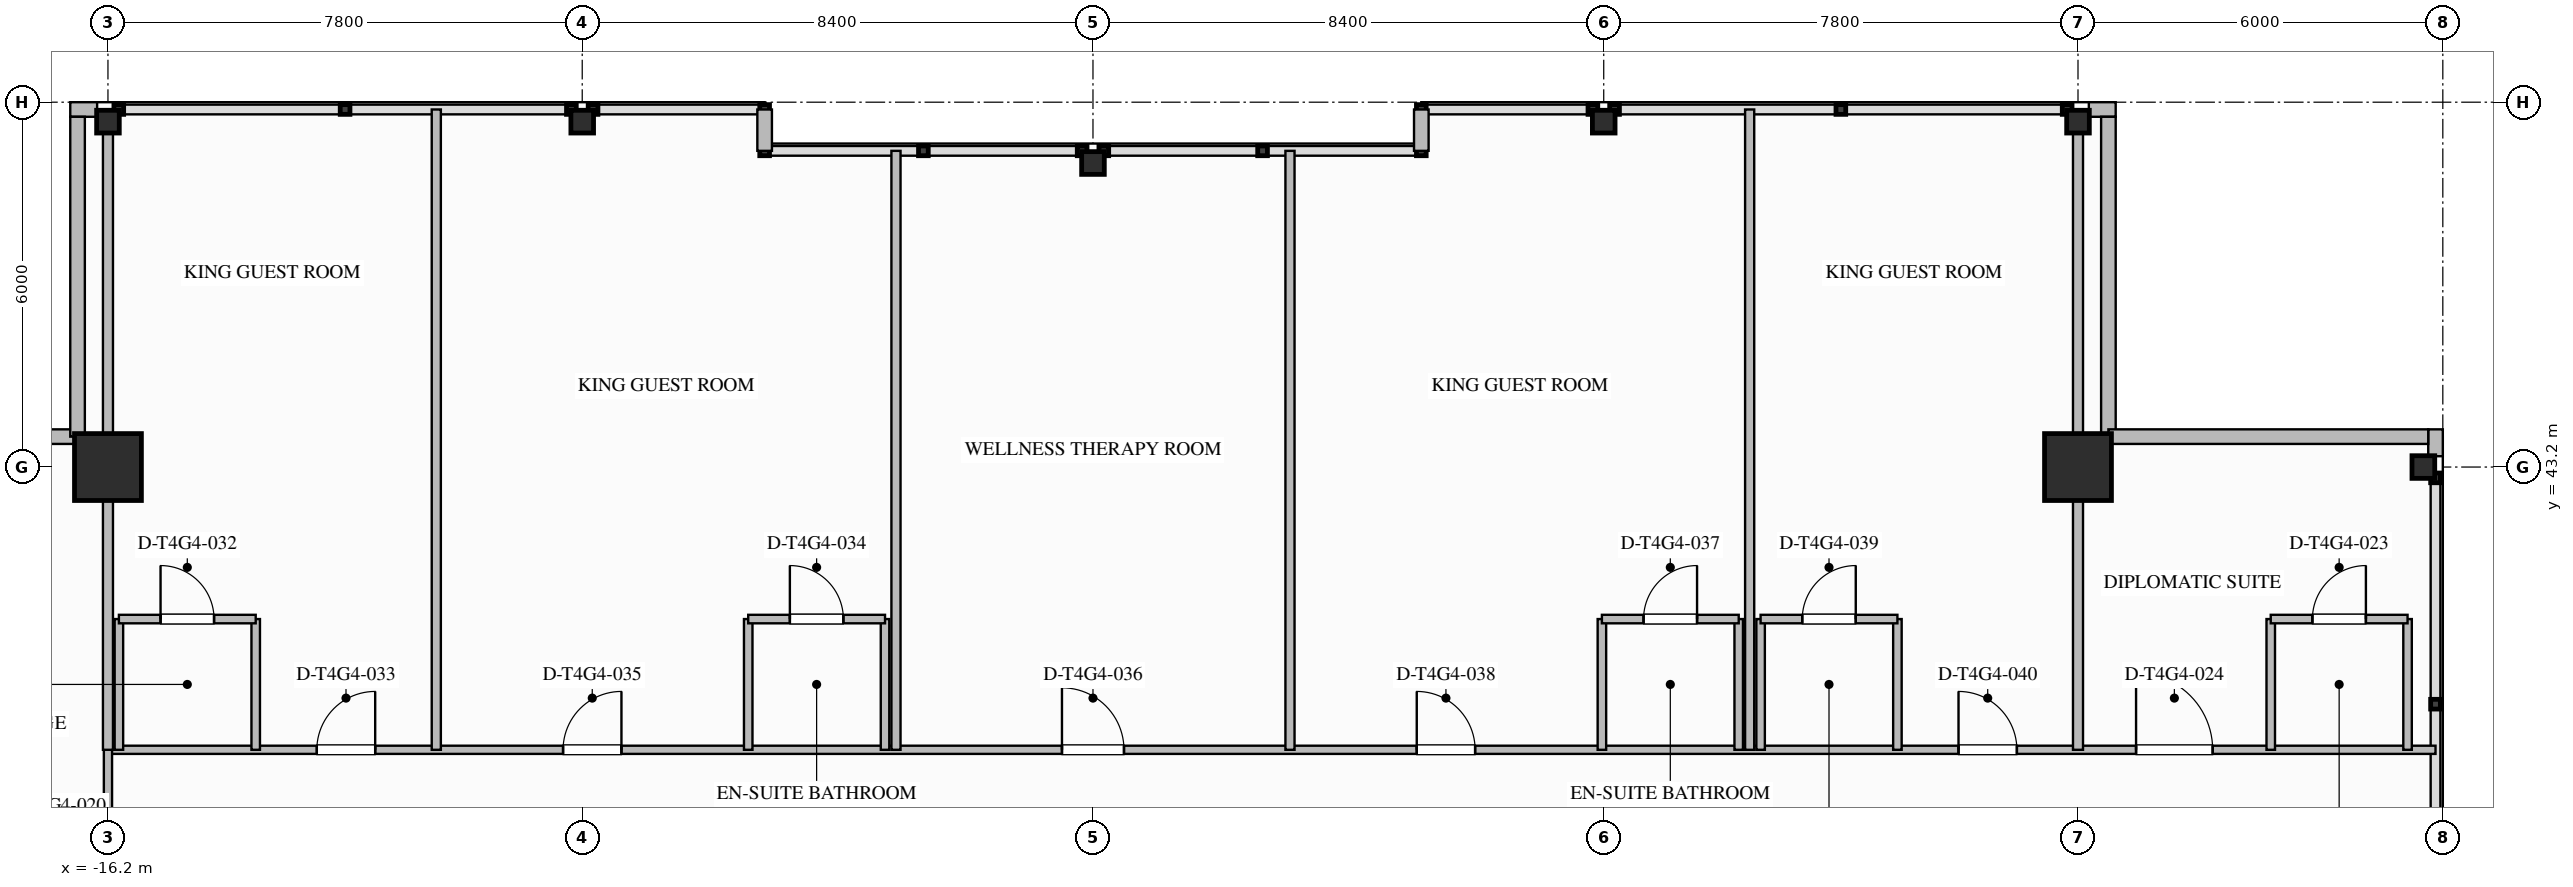
"""IFC4 building model, lengths in metres.
Left out: names, types, materials, properties, quantities, classifications, styles, units other than length and angle.
Written with IfcOpenShell. Run it as: python <this file> out.ifc"""

import sys

from ifc_helpers import new_model, si_unit, direction, frame, frame_2d, origin, origin_2d, place, context, subcontext, project, spatial, rectangle, i_section, extrude, element, fill, save


model = new_model("IFC4")
c1 = context("Model", 3, precision=1e-05, world=origin(), true_north=direction((0.0, 1.0)))
c2 = subcontext(c1, "Body", "Model", "MODEL_VIEW")
j1 = project(units=[si_unit("LENGTHUNIT", "METRE"), si_unit("PLANEANGLEUNIT", "RADIAN")], contexts=[c1])
p1 = place(None, origin())
s1 = spatial("IfcSite", under=j1, at=p1, CompositionType="ELEMENT")
p2 = place(p1, origin())
s2 = spatial("IfcBuilding", under=s1, at=p2, CompositionType="ELEMENT")
p3 = place(p2, frame((0.0, 0.0, 237.5)))
s3 = spatial("IfcBuildingStorey", under=s2, at=p3, CompositionType="ELEMENT", Elevation=237.5)
for number, where, z_axis, x_axis in (
    (1, (-16.2, 43.2, 0.0), (0.0, 0.0, 1.0), (1.0, 0.0, 0.0)),
    (2, (16.2, 43.2, 0.0), (0.0, 0.0, 1.0), (1.0, 0.0, 0.0)),
):
    element("IfcColumn", number, at=place(p3, frame(where, z_axis=z_axis, x_axis=x_axis)), inside=s3, PredefinedType="COLUMN", context=c2, shape_type="SweptSolid", body=[
        extrude(rectangle(XDim=1.1, YDim=1.1, at=origin_2d()), origin(), (0.0, 0.0, 1.0), 3.6),
    ])
for number, where, z_axis, x_axis in (
    (3, (21.88, 43.2, 0.0), (0.0, 0.0, 1.0), (1.0, 0.0, 0.0)),
    (4, (-16.2, 48.88, 0.0), (0.0, 0.0, 1.0), (0.0, 1.0, 0.0)),
    (5, (-8.4, 48.88, 0.0), (0.0, 0.0, 1.0), (0.0, 1.0, 0.0)),
    (6, (0.0, 48.2, 0.0), (0.0, 0.0, 1.0), (0.0, 1.0, 0.0)),
    (7, (8.4, 48.88, 0.0), (0.0, 0.0, 1.0), (0.0, 1.0, 0.0)),
    (8, (16.2, 48.88, 0.0), (0.0, 0.0, 1.0), (0.0, 1.0, 0.0)),
):
    element("IfcColumn", number, at=place(p3, frame(where, z_axis=z_axis, x_axis=x_axis)), inside=s3, PredefinedType="COLUMN", context=c2, shape_type="SweptSolid", body=[
        extrude(i_section(OverallWidth=0.374, OverallDepth=0.372, WebThickness=0.016, FlangeThickness=0.026, FilletRadius=0.025, at=origin_2d()), origin(), (0.0, 0.0, 1.0), 3.597),
    ])
for number, where, z_axis, x_axis in (
    (9, (22.08, 43.82, 0.0), (0.0, 0.0, 1.0), (0.0, -1.0, 0.0)),
    (10, (-16.82, 49.08, 0.0), (0.0, 0.0, 1.0), (1.0, 0.0, 0.0)),
    (11, (16.378, 49.08, 0.0), (0.0, 0.0, 1.0), (1.0, 0.0, 0.0)),
):
    element("IfcWall", number, at=place(p3, frame(where, z_axis=z_axis, x_axis=x_axis)), inside=s3, PredefinedType="STANDARD", context=c2, shape_type="SweptSolid", body=[
        extrude(rectangle(XDim=0.442, YDim=0.24, at=frame_2d((0.221, 0.0))), origin(), (0.0, 0.0, 1.0), 3.34),
    ])
for number, where, z_axis, x_axis in (
    (12, (-21.96, 43.7, 0.0), (0.0, 0.0, 1.0), (1.0, 0.0, 0.0)),
    (13, (-16.7, 43.7, 0.0), (0.0, 0.0, 1.0), (0.0, 1.0, 0.0)),
    (14, (16.7, 48.96, 0.0), (0.0, 0.0, 1.0), (0.0, -1.0, 0.0)),
    (15, (16.7, 43.7, 0.0), (0.0, 0.0, 1.0), (1.0, 0.0, 0.0)),
):
    element("IfcWall", number, at=place(p3, frame(where, z_axis=z_axis, x_axis=x_axis)), inside=s3, PredefinedType="STANDARD", context=c2, shape_type="SweptSolid", body=[
        extrude(rectangle(XDim=5.26, YDim=0.24, at=frame_2d((2.63, 0.0))), origin(), (0.0, 0.0, 1.0), 3.34),
    ])
for number, where, z_axis, x_axis in (
    (16, (-5.4, 49.08, 0.0), (0.0, 0.0, 1.0), (0.0, -1.0, 0.0)),
    (17, (5.4, 48.4, 0.0), (0.0, 0.0, 1.0), (0.0, 1.0, 0.0)),
):
    element("IfcWall", number, at=place(p3, frame(where, z_axis=z_axis, x_axis=x_axis)), inside=s3, PredefinedType="STANDARD", context=c2, shape_type="SweptSolid", body=[
        extrude(rectangle(XDim=0.68, YDim=0.24, at=frame_2d((0.34, 0.0))), origin(), (0.0, 0.0, 1.0), 3.34),
    ])
p4 = place(p3, frame((-16.2, 38.55, 0.0), z_axis=(0.0, 0.0, 1.0), x_axis=(1.0, 0.0, 0.0)))
e18 = element("IfcWall", 18, at=p4, inside=s3, PredefinedType="PARTITIONING", context=c2, shape_type="SweptSolid", body=[
    extrude(rectangle(XDim=38.28, YDim=0.135, at=frame_2d((19.14, 0.0))), origin(), (0.0, 0.0, 1.0), 3.34),
])
p5 = place(p4, frame((33.355, 0.0, 0.0)))
e19 = element("IfcOpeningElement", 19, at=p5, cuts=e18, PredefinedType="OPENING", context=c2, shape_type="SweptSolid", body=[
    extrude(rectangle(XDim=1.26, YDim=2.2, at=frame_2d((0.63, 1.1))), frame((0.0, 0.077, 0.0), z_axis=(0.0, -1.0, 0.0), x_axis=(1.0, 0.0, 0.0)), (0.0, 0.0, 1.0), 0.155),
])
p6 = place(p4, frame((3.435, 0.0, 0.0)))
e20 = element("IfcOpeningElement", 20, at=p6, cuts=e18, PredefinedType="OPENING", context=c2, shape_type="SweptSolid", body=[
    extrude(rectangle(XDim=0.96, YDim=2.15, at=frame_2d((0.48, 1.075))), frame((0.0, 0.077, 0.0), z_axis=(0.0, -1.0, 0.0), x_axis=(1.0, 0.0, 0.0)), (0.0, 0.0, 1.0), 0.155),
])
p7 = place(p4, frame((7.485, 0.0, 0.0)))
e21 = element("IfcOpeningElement", 21, at=p7, cuts=e18, PredefinedType="OPENING", context=c2, shape_type="SweptSolid", body=[
    extrude(rectangle(XDim=0.96, YDim=2.15, at=frame_2d((0.48, 1.075))), frame((0.0, 0.077, 0.0), z_axis=(0.0, -1.0, 0.0), x_axis=(1.0, 0.0, 0.0)), (0.0, 0.0, 1.0), 0.155),
])
p8 = place(p4, frame((15.69, 0.0, 0.0)))
e22 = element("IfcOpeningElement", 22, at=p8, cuts=e18, PredefinedType="OPENING", context=c2, shape_type="SweptSolid", body=[
    extrude(rectangle(XDim=1.02, YDim=2.15, at=frame_2d((0.51, 1.075))), frame((0.0, 0.077, 0.0), z_axis=(0.0, -1.0, 0.0), x_axis=(1.0, 0.0, 0.0)), (0.0, 0.0, 1.0), 0.155),
])
p9 = place(p4, frame((21.525, 0.0, 0.0)))
e23 = element("IfcOpeningElement", 23, at=p9, cuts=e18, PredefinedType="OPENING", context=c2, shape_type="SweptSolid", body=[
    extrude(rectangle(XDim=0.96, YDim=2.15, at=frame_2d((0.48, 1.075))), frame((0.0, 0.077, 0.0), z_axis=(0.0, -1.0, 0.0), x_axis=(1.0, 0.0, 0.0)), (0.0, 0.0, 1.0), 0.155),
])
p10 = place(p4, frame((30.435, 0.0, 0.0)))
e24 = element("IfcOpeningElement", 24, at=p10, cuts=e18, PredefinedType="OPENING", context=c2, shape_type="SweptSolid", body=[
    extrude(rectangle(XDim=0.96, YDim=2.15, at=frame_2d((0.48, 1.075))), frame((0.0, 0.077, 0.0), z_axis=(0.0, -1.0, 0.0), x_axis=(1.0, 0.0, 0.0)), (0.0, 0.0, 1.0), 0.155),
])
p11 = place(p3, frame((-16.2, 35.6, 0.0), z_axis=(0.0, 0.0, 1.0), x_axis=(0.0, 1.0, 0.0)))
e25 = element("IfcWall", 25, at=p11, inside=s3, PredefinedType="PARTITIONING", context=c2, shape_type="SweptSolid", body=[
    extrude(rectangle(XDim=2.95, YDim=0.135, at=frame_2d((1.475, 0.0))), origin(), (0.0, 0.0, 1.0), 2.714),
])
p12 = place(p11, frame((0.52, 0.0, 0.0)))
e26 = element("IfcOpeningElement", 26, at=p12, cuts=e25, PredefinedType="OPENING", context=c2, shape_type="SweptSolid", body=[
    extrude(rectangle(XDim=1.02, YDim=2.15, at=frame_2d((0.51, 1.075))), frame((0.0, 0.077, 0.0), z_axis=(0.0, -1.0, 0.0), x_axis=(1.0, 0.0, 0.0)), (0.0, 0.0, 1.0), 0.155),
])
for number, where, z_axis, x_axis in (
    (27, (-16.2, 38.55, 0.0), (0.0, 0.0, 1.0), (0.0, 1.0, 0.0)),
    (28, (16.2, 38.55, 0.0), (0.0, 0.0, 1.0), (0.0, 1.0, 0.0)),
):
    element("IfcWall", number, at=place(p3, frame(where, z_axis=z_axis, x_axis=x_axis)), inside=s3, PredefinedType="PARTITIONING", context=c2, shape_type="SweptSolid", body=[
        extrude(rectangle(XDim=10.53, YDim=0.165, at=frame_2d((5.265, 0.0))), origin(), (0.0, 0.0, 1.0), 2.714),
    ])
for number, where, z_axis, x_axis in (
    (29, (19.37, 38.55, 0.0), (0.0, 0.0, 1.0), (0.0, 1.0, 0.0)),
    (30, (21.62, 38.55, 0.0), (0.0, 0.0, 1.0), (0.0, 1.0, 0.0)),
):
    element("IfcWall", number, at=place(p3, frame(where, z_axis=z_axis, x_axis=x_axis)), inside=s3, PredefinedType="PLUMBINGWALL", context=c2, shape_type="SweptSolid", body=[
        extrude(rectangle(XDim=2.15, YDim=0.14, at=frame_2d((1.075, 0.0))), origin(), (0.0, 0.0, 1.0), 3.34),
    ])
p13 = place(p3, frame((19.37, 40.7, 0.0), z_axis=(0.0, 0.0, 1.0), x_axis=(1.0, 0.0, 0.0)))
e31 = element("IfcWall", 31, at=p13, inside=s3, PredefinedType="PLUMBINGWALL", context=c2, shape_type="SweptSolid", body=[
    extrude(rectangle(XDim=2.25, YDim=0.14, at=frame_2d((1.125, 0.0))), origin(), (0.0, 0.0, 1.0), 3.34),
])
p14 = place(p13, frame((0.685, 0.0, 0.0)))
e32 = element("IfcOpeningElement", 32, at=p14, cuts=e31, PredefinedType="OPENING", context=c2, shape_type="SweptSolid", body=[
    extrude(rectangle(XDim=0.88, YDim=2.1, at=frame_2d((0.44, 1.05))), frame((0.0, 0.08, 0.0), z_axis=(0.0, -1.0, 0.0), x_axis=(1.0, 0.0, 0.0)), (0.0, 0.0, 1.0), 0.16),
])
p15 = place(p3, frame((-16.02, 38.55, 0.0), z_axis=(0.0, 0.0, 1.0), x_axis=(0.0, 1.0, 0.0)))
e33 = element("IfcWall", 33, at=p15, inside=s3, PredefinedType="PLUMBINGWALL", context=c2, shape_type="SweptSolid", body=[
    extrude(rectangle(XDim=2.15, YDim=0.14, at=frame_2d((1.075, 0.0))), origin(), (0.0, 0.0, 1.0), 2.714),
])
p16 = place(p3, frame((-13.77, 38.55, 0.0), z_axis=(0.0, 0.0, 1.0), x_axis=(0.0, 1.0, 0.0)))
e34 = element("IfcWall", 34, at=p16, inside=s3, PredefinedType="PLUMBINGWALL", context=c2, shape_type="SweptSolid", body=[
    extrude(rectangle(XDim=2.15, YDim=0.14, at=frame_2d((1.075, 0.0))), origin(), (0.0, 0.0, 1.0), 3.34),
])
p17 = place(p3, frame((-16.02, 40.7, 0.0), z_axis=(0.0, 0.0, 1.0), x_axis=(1.0, 0.0, 0.0)))
e35 = element("IfcWall", 35, at=p17, inside=s3, PredefinedType="PLUMBINGWALL", context=c2, shape_type="SweptSolid", body=[
    extrude(rectangle(XDim=2.25, YDim=0.14, at=frame_2d((1.125, 0.0))), origin(), (0.0, 0.0, 1.0), 3.34),
])
p18 = place(p17, frame((0.685, 0.0, 0.0)))
e36 = element("IfcOpeningElement", 36, at=p18, cuts=e35, PredefinedType="OPENING", context=c2, shape_type="SweptSolid", body=[
    extrude(rectangle(XDim=0.88, YDim=2.1, at=frame_2d((0.44, 1.05))), frame((0.0, 0.08, 0.0), z_axis=(0.0, -1.0, 0.0), x_axis=(1.0, 0.0, 0.0)), (0.0, 0.0, 1.0), 0.16),
])
p19 = place(p3, frame((-10.8, 38.55, 0.0), z_axis=(0.0, 0.0, 1.0), x_axis=(0.0, 1.0, 0.0)))
e37 = element("IfcWall", 37, at=p19, inside=s3, PredefinedType="PARTITIONING", context=c2, shape_type="SweptSolid", body=[
    extrude(rectangle(XDim=10.53, YDim=0.15, at=frame_2d((5.265, 0.0))), origin(), (0.0, 0.0, 1.0), 3.34),
])
for number, where, z_axis, x_axis in (
    (38, (-5.67, 38.55, 0.0), (0.0, 0.0, 1.0), (0.0, 1.0, 0.0)),
    (39, (-3.42, 38.55, 0.0), (0.0, 0.0, 1.0), (0.0, 1.0, 0.0)),
):
    element("IfcWall", number, at=place(p3, frame(where, z_axis=z_axis, x_axis=x_axis)), inside=s3, PredefinedType="PLUMBINGWALL", context=c2, shape_type="SweptSolid", body=[
        extrude(rectangle(XDim=2.15, YDim=0.14, at=frame_2d((1.075, 0.0))), origin(), (0.0, 0.0, 1.0), 3.34),
    ])
p20 = place(p3, frame((-5.67, 40.7, 0.0), z_axis=(0.0, 0.0, 1.0), x_axis=(1.0, 0.0, 0.0)))
e40 = element("IfcWall", 40, at=p20, inside=s3, PredefinedType="PLUMBINGWALL", context=c2, shape_type="SweptSolid", body=[
    extrude(rectangle(XDim=2.25, YDim=0.14, at=frame_2d((1.125, 0.0))), origin(), (0.0, 0.0, 1.0), 3.34),
])
p21 = place(p20, frame((0.685, 0.0, 0.0)))
e41 = element("IfcOpeningElement", 41, at=p21, cuts=e40, PredefinedType="OPENING", context=c2, shape_type="SweptSolid", body=[
    extrude(rectangle(XDim=0.88, YDim=2.1, at=frame_2d((0.44, 1.05))), frame((0.0, 0.08, 0.0), z_axis=(0.0, -1.0, 0.0), x_axis=(1.0, 0.0, 0.0)), (0.0, 0.0, 1.0), 0.16),
])
for number, where, z_axis, x_axis in (
    (42, (-3.24, 38.55, 0.0), (0.0, 0.0, 1.0), (0.0, 1.0, 0.0)),
    (43, (3.24, 38.55, 0.0), (0.0, 0.0, 1.0), (0.0, 1.0, 0.0)),
):
    element("IfcWall", number, at=place(p3, frame(where, z_axis=z_axis, x_axis=x_axis)), inside=s3, PredefinedType="PARTITIONING", context=c2, shape_type="SweptSolid", body=[
        extrude(rectangle(XDim=9.85, YDim=0.15, at=frame_2d((4.925, 0.0))), origin(), (0.0, 0.0, 1.0), 3.34),
    ])
p22 = place(p3, frame((8.37, 38.55, 0.0), z_axis=(0.0, 0.0, 1.0), x_axis=(0.0, 1.0, 0.0)))
e44 = element("IfcWall", 44, at=p22, inside=s3, PredefinedType="PLUMBINGWALL", context=c2, shape_type="SweptSolid", body=[
    extrude(rectangle(XDim=2.15, YDim=0.14, at=frame_2d((1.075, 0.0))), origin(), (0.0, 0.0, 1.0), 2.717),
])
p23 = place(p3, frame((10.62, 38.55, 0.0), z_axis=(0.0, 0.0, 1.0), x_axis=(0.0, 1.0, 0.0)))
e45 = element("IfcWall", 45, at=p23, inside=s3, PredefinedType="PLUMBINGWALL", context=c2, shape_type="SweptSolid", body=[
    extrude(rectangle(XDim=2.15, YDim=0.14, at=frame_2d((1.075, 0.0))), origin(), (0.0, 0.0, 1.0), 3.34),
])
p24 = place(p3, frame((8.37, 40.7, 0.0), z_axis=(0.0, 0.0, 1.0), x_axis=(1.0, 0.0, 0.0)))
e46 = element("IfcWall", 46, at=p24, inside=s3, PredefinedType="PLUMBINGWALL", context=c2, shape_type="SweptSolid", body=[
    extrude(rectangle(XDim=2.25, YDim=0.14, at=frame_2d((1.125, 0.0))), origin(), (0.0, 0.0, 1.0), 3.34),
])
p25 = place(p24, frame((0.685, 0.0, 0.0)))
e47 = element("IfcOpeningElement", 47, at=p25, cuts=e46, PredefinedType="OPENING", context=c2, shape_type="SweptSolid", body=[
    extrude(rectangle(XDim=0.88, YDim=2.1, at=frame_2d((0.44, 1.05))), frame((0.0, 0.08, 0.0), z_axis=(0.0, -1.0, 0.0), x_axis=(1.0, 0.0, 0.0)), (0.0, 0.0, 1.0), 0.16),
])
p26 = place(p3, frame((10.8, 38.55, 0.0), z_axis=(0.0, 0.0, 1.0), x_axis=(0.0, 1.0, 0.0)))
e48 = element("IfcWall", 48, at=p26, inside=s3, PredefinedType="PARTITIONING", context=c2, shape_type="SweptSolid", body=[
    extrude(rectangle(XDim=10.53, YDim=0.15, at=frame_2d((5.265, 0.0))), origin(), (0.0, 0.0, 1.0), 3.34),
])
for number, where, z_axis, x_axis in (
    (49, (10.98, 38.55, 0.0), (0.0, 0.0, 1.0), (0.0, 1.0, 0.0)),
    (50, (13.23, 38.55, 0.0), (0.0, 0.0, 1.0), (0.0, 1.0, 0.0)),
):
    element("IfcWall", number, at=place(p3, frame(where, z_axis=z_axis, x_axis=x_axis)), inside=s3, PredefinedType="PLUMBINGWALL", context=c2, shape_type="SweptSolid", body=[
        extrude(rectangle(XDim=2.15, YDim=0.14, at=frame_2d((1.075, 0.0))), origin(), (0.0, 0.0, 1.0), 3.34),
    ])
p27 = place(p3, frame((10.98, 40.7, 0.0), z_axis=(0.0, 0.0, 1.0), x_axis=(1.0, 0.0, 0.0)))
e51 = element("IfcWall", 51, at=p27, inside=s3, PredefinedType="PLUMBINGWALL", context=c2, shape_type="SweptSolid", body=[
    extrude(rectangle(XDim=2.25, YDim=0.14, at=frame_2d((1.125, 0.0))), origin(), (0.0, 0.0, 1.0), 3.34),
])
p28 = place(p27, frame((0.685, 0.0, 0.0)))
e52 = element("IfcOpeningElement", 52, at=p28, cuts=e51, PredefinedType="OPENING", context=c2, shape_type="SweptSolid", body=[
    extrude(rectangle(XDim=0.88, YDim=2.1, at=frame_2d((0.44, 1.05))), frame((0.0, 0.08, 0.0), z_axis=(0.0, -1.0, 0.0), x_axis=(1.0, 0.0, 0.0)), (0.0, 0.0, 1.0), 0.16),
])
p29 = place(p14, origin())
e53 = element("IfcDoor", 53, at=p29, inside=s3, OperationType="SINGLE_SWING_RIGHT", PredefinedType="DOOR", context=c2, shape_type="SweptSolid", body=[
    extrude(rectangle(XDim=0.88, YDim=2.1, at=frame_2d((0.44, 1.05))), frame((0.0, 0.025, 0.0), z_axis=(0.0, -1.0, 0.0), x_axis=(1.0, 0.0, 0.0)), (0.0, 0.0, 1.0), 0.05),
])
fill(e32, e53)
p30 = place(p5, origin())
e54 = element("IfcDoor", 54, at=p30, inside=s3, OperationType="SINGLE_SWING_LEFT", PredefinedType="DOOR", context=c2, shape_type="SweptSolid", body=[
    extrude(rectangle(XDim=1.26, YDim=2.2, at=frame_2d((0.63, 1.1))), frame((0.0, 0.025, 0.0), z_axis=(0.0, -1.0, 0.0), x_axis=(1.0, 0.0, 0.0)), (0.0, 0.0, 1.0), 0.05),
])
fill(e19, e54)
p31 = place(p18, origin())
e55 = element("IfcDoor", 55, at=p31, inside=s3, OperationType="SINGLE_SWING_LEFT", PredefinedType="DOOR", context=c2, shape_type="SweptSolid", body=[
    extrude(rectangle(XDim=0.88, YDim=2.1, at=frame_2d((0.44, 1.05))), frame((0.0, 0.025, 0.0), z_axis=(0.0, -1.0, 0.0), x_axis=(1.0, 0.0, 0.0)), (0.0, 0.0, 1.0), 0.05),
])
fill(e36, e55)
p32 = place(p6, origin())
e56 = element("IfcDoor", 56, at=p32, inside=s3, OperationType="SINGLE_SWING_RIGHT", PredefinedType="DOOR", context=c2, shape_type="SweptSolid", body=[
    extrude(rectangle(XDim=0.96, YDim=2.15, at=frame_2d((0.48, 1.075))), frame((0.0, 0.025, 0.0), z_axis=(0.0, -1.0, 0.0), x_axis=(1.0, 0.0, 0.0)), (0.0, 0.0, 1.0), 0.05),
])
fill(e20, e56)
p33 = place(p21, origin())
e57 = element("IfcDoor", 57, at=p33, inside=s3, OperationType="SINGLE_SWING_LEFT", PredefinedType="DOOR", context=c2, shape_type="SweptSolid", body=[
    extrude(rectangle(XDim=0.88, YDim=2.1, at=frame_2d((0.44, 1.05))), frame((0.0, 0.025, 0.0), z_axis=(0.0, -1.0, 0.0), x_axis=(1.0, 0.0, 0.0)), (0.0, 0.0, 1.0), 0.05),
])
fill(e41, e57)
p34 = place(p7, origin())
e58 = element("IfcDoor", 58, at=p34, inside=s3, OperationType="SINGLE_SWING_RIGHT", PredefinedType="DOOR", context=c2, shape_type="SweptSolid", body=[
    extrude(rectangle(XDim=0.96, YDim=2.15, at=frame_2d((0.48, 1.075))), frame((0.0, 0.025, 0.0), z_axis=(0.0, -1.0, 0.0), x_axis=(1.0, 0.0, 0.0)), (0.0, 0.0, 1.0), 0.05),
])
fill(e21, e58)
p35 = place(p8, origin())
e59 = element("IfcDoor", 59, at=p35, inside=s3, OperationType="SINGLE_SWING_LEFT", PredefinedType="DOOR", context=c2, shape_type="SweptSolid", body=[
    extrude(rectangle(XDim=1.02, YDim=2.15, at=frame_2d((0.51, 1.075))), frame((0.0, 0.025, 0.0), z_axis=(0.0, -1.0, 0.0), x_axis=(1.0, 0.0, 0.0)), (0.0, 0.0, 1.0), 0.05),
])
fill(e22, e59)
p36 = place(p25, origin())
e60 = element("IfcDoor", 60, at=p36, inside=s3, OperationType="SINGLE_SWING_RIGHT", PredefinedType="DOOR", context=c2, shape_type="SweptSolid", body=[
    extrude(rectangle(XDim=0.88, YDim=2.1, at=frame_2d((0.44, 1.05))), frame((0.0, 0.025, 0.0), z_axis=(0.0, -1.0, 0.0), x_axis=(1.0, 0.0, 0.0)), (0.0, 0.0, 1.0), 0.05),
])
fill(e47, e60)
p37 = place(p9, origin())
e61 = element("IfcDoor", 61, at=p37, inside=s3, OperationType="SINGLE_SWING_LEFT", PredefinedType="DOOR", context=c2, shape_type="SweptSolid", body=[
    extrude(rectangle(XDim=0.96, YDim=2.15, at=frame_2d((0.48, 1.075))), frame((0.0, 0.025, 0.0), z_axis=(0.0, -1.0, 0.0), x_axis=(1.0, 0.0, 0.0)), (0.0, 0.0, 1.0), 0.05),
])
fill(e23, e61)
p38 = place(p28, origin())
e62 = element("IfcDoor", 62, at=p38, inside=s3, OperationType="SINGLE_SWING_RIGHT", PredefinedType="DOOR", context=c2, shape_type="SweptSolid", body=[
    extrude(rectangle(XDim=0.88, YDim=2.1, at=frame_2d((0.44, 1.05))), frame((0.0, 0.025, 0.0), z_axis=(0.0, -1.0, 0.0), x_axis=(1.0, 0.0, 0.0)), (0.0, 0.0, 1.0), 0.05),
])
fill(e52, e62)
p39 = place(p10, origin())
e63 = element("IfcDoor", 63, at=p39, inside=s3, OperationType="SINGLE_SWING_LEFT", PredefinedType="DOOR", context=c2, shape_type="SweptSolid", body=[
    extrude(rectangle(XDim=0.96, YDim=2.15, at=frame_2d((0.48, 1.075))), frame((0.0, 0.025, 0.0), z_axis=(0.0, -1.0, 0.0), x_axis=(1.0, 0.0, 0.0)), (0.0, 0.0, 1.0), 0.05),
])
fill(e24, e63)
save(model, sys.argv[1])
